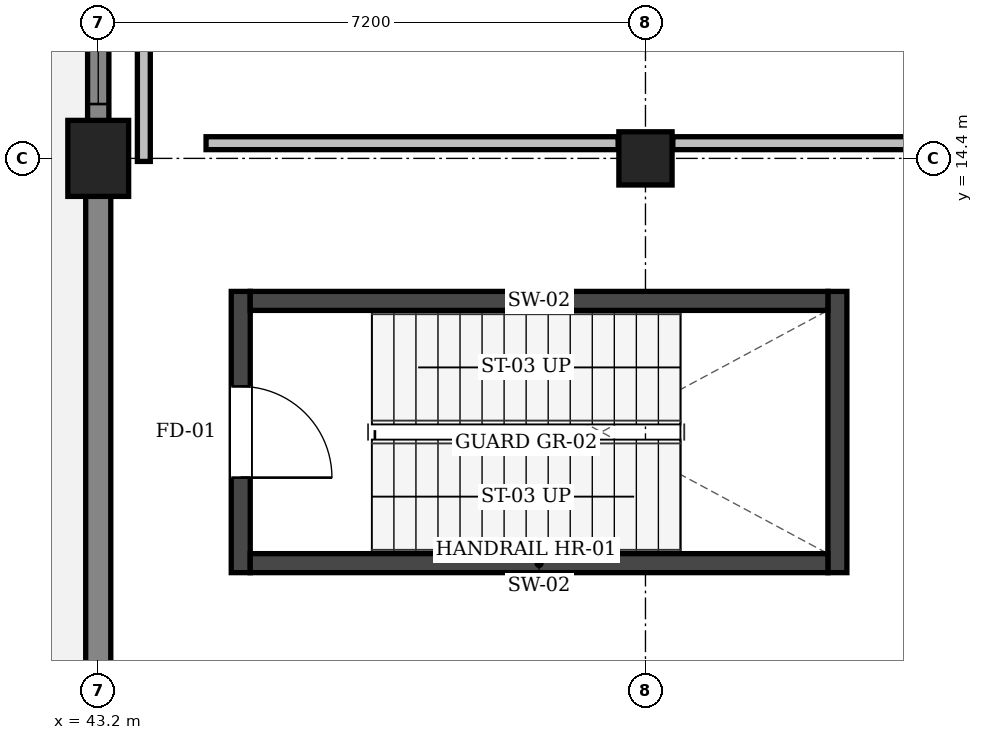
"""IFC4 building model, lengths in metres.
Left out: names, types, materials, properties, quantities, classifications, styles, units other than length and angle.
Written with IfcOpenShell. Run it as: python <this file> out.ifc"""

import sys

from ifc_helpers import new_model, si_unit, direction, frame, frame_2d, origin, origin_2d, place, context, subcontext, project, spatial, rectangle, extrude, element, fill, save


model = new_model("IFC4")
c1 = context("Model", 3, precision=1e-05, world=origin(), true_north=direction((0.0, 1.0)))
c2 = subcontext(c1, "Body", "Model", "MODEL_VIEW")
j1 = project(units=[si_unit("LENGTHUNIT", "METRE"), si_unit("PLANEANGLEUNIT", "RADIAN")], contexts=[c1])
p1 = place(None, origin())
s1 = spatial("IfcSite", under=j1, at=p1, CompositionType="ELEMENT")
p2 = place(p1, origin())
s2 = spatial("IfcBuilding", under=s1, at=p2, CompositionType="ELEMENT")
p3 = place(p2, frame((0.0, 0.0, 18.9)))
s3 = spatial("IfcBuildingStorey", under=s2, at=p3, CompositionType="ELEMENT", Elevation=18.9)
p4 = place(p3, frame((43.2, 14.4, 0.0), z_axis=(0.0, 0.0, 1.0), x_axis=(1.0, 0.0, 0.0)))
e1 = element("IfcColumn", 1, at=p4, inside=s3, PredefinedType="COLUMN", context=c2, shape_type="SweptSolid", body=[
    extrude(rectangle(XDim=0.8, YDim=1.0, at=origin_2d()), origin(), (0.0, 0.0, 1.0), 4.5),
])
p5 = place(p3, frame((50.4, 14.4, 0.0), z_axis=(0.0, 0.0, 1.0), x_axis=(1.0, 0.0, 0.0)))
e2 = element("IfcColumn", 2, at=p5, inside=s3, PredefinedType="COLUMN", context=c2, shape_type="SweptSolid", body=[
    extrude(rectangle(XDim=0.7, YDim=0.7, at=origin_2d()), origin(), (0.0, 0.0, 1.0), 4.5),
])
p6 = place(p3, frame((43.2, 7.2, 0.0), z_axis=(0.0, 0.0, 1.0), x_axis=(0.0, 1.0, 0.0)))
e3 = element("IfcWall", 3, at=p6, inside=s3, PredefinedType="SOLIDWALL", context=c2, shape_type="SweptSolid", body=[
    extrude(rectangle(XDim=7.2, YDim=0.33, at=frame_2d((3.6, 0.0))), origin(), (0.0, 0.0, 1.0), 4.22),
])
p7 = place(p3, frame((43.2, 14.4, 0.0), z_axis=(0.0, 0.0, 1.0), x_axis=(0.0, 1.0, 0.0)))
e4 = element("IfcWall", 4, at=p7, inside=s3, PredefinedType="SOLIDWALL", context=c2, shape_type="SweptSolid", body=[
    extrude(rectangle(XDim=7.2, YDim=0.28, at=frame_2d((3.6, 0.0))), origin(), (0.0, 0.0, 1.0), 4.22),
])
p8 = place(p7, frame((0.715, 0.0, 0.95)))
e5 = element("IfcOpeningElement", 5, at=p8, cuts=e4, PredefinedType="OPENING", context=c2, shape_type="SweptSolid", body=[
    extrude(rectangle(XDim=2.45, YDim=1.55, at=frame_2d((1.225, 0.775))), frame((0.0, 0.152, 0.0), z_axis=(0.0, -1.0, 0.0), x_axis=(1.0, 0.0, 0.0)), (0.0, 0.0, 1.0), 0.304),
])
p9 = place(p3, frame((45.075, 8.95, 0.0), z_axis=(0.0, 0.0, 1.0), x_axis=(0.0, 1.0, 0.0)))
e6 = element("IfcWall", 6, at=p9, inside=s3, PredefinedType="SHEAR", context=c2, shape_type="SweptSolid", body=[
    extrude(rectangle(XDim=3.7, YDim=0.25, at=frame_2d((1.85, 0.0))), origin(), (0.0, 0.0, 1.0), 4.25),
])
p10 = place(p9, frame((1.25, 0.0, 0.0)))
e7 = element("IfcOpeningElement", 7, at=p10, cuts=e6, PredefinedType="OPENING", context=c2, shape_type="SweptSolid", body=[
    extrude(rectangle(XDim=1.2, YDim=2.15, at=frame_2d((0.6, 1.075))), frame((0.0, 0.137, 0.0), z_axis=(0.0, -1.0, 0.0), x_axis=(1.0, 0.0, 0.0)), (0.0, 0.0, 1.0), 0.274),
])
p11 = place(p3, frame((52.925, 8.95, 0.0), z_axis=(0.0, 0.0, 1.0), x_axis=(0.0, 1.0, 0.0)))
e8 = element("IfcWall", 8, at=p11, inside=s3, PredefinedType="SHEAR", context=c2, shape_type="SweptSolid", body=[
    extrude(rectangle(XDim=3.7, YDim=0.25, at=frame_2d((1.85, 0.0))), origin(), (0.0, 0.0, 1.0), 4.25),
])
for number, where, z_axis, x_axis in (
    (9, (45.2, 9.075, 0.0), (0.0, 0.0, 1.0), (1.0, 0.0, 0.0)),
    (10, (45.2, 12.525, 0.0), (0.0, 0.0, 1.0), (1.0, 0.0, 0.0)),
):
    element("IfcWall", number, at=place(p3, frame(where, z_axis=z_axis, x_axis=x_axis)), inside=s3, PredefinedType="SHEAR", context=c2, shape_type="SweptSolid", body=[
        extrude(rectangle(XDim=7.6, YDim=0.25, at=frame_2d((3.8, 0.0))), origin(), (0.0, 0.0, 1.0), 4.25),
    ])
p12 = place(p3, frame((50.76, 14.6, 0.0), z_axis=(0.0, 0.0, 1.0), x_axis=(1.0, 0.0, 0.0)))
e11 = element("IfcWall", 11, at=p12, inside=s3, PredefinedType="PARTITIONING", context=c2, shape_type="SweptSolid", body=[
    extrude(rectangle(XDim=6.48, YDim=0.17, at=frame_2d((3.24, 0.0))), origin(), (0.0, 0.0, 1.0), 3.73),
])
p13 = place(p3, frame((44.618, 14.6, 0.0), z_axis=(0.0, 0.0, 1.0), x_axis=(1.0, 0.0, 0.0)))
e12 = element("IfcWall", 12, at=p13, inside=s3, PredefinedType="PARTITIONING", context=c2, shape_type="SweptSolid", body=[
    extrude(rectangle(XDim=5.422, YDim=0.17, at=frame_2d((2.711, 0.0))), origin(), (0.0, 0.0, 1.0), 3.73),
])
p14 = place(p3, frame((43.8, 14.36, 0.0), z_axis=(0.0, 0.0, 1.0), x_axis=(0.0, 1.0, 0.0)))
e13 = element("IfcWall", 13, at=p14, inside=s3, PredefinedType="PARTITIONING", context=c2, shape_type="SweptSolid", body=[
    extrude(rectangle(XDim=3.74, YDim=0.17, at=frame_2d((1.87, 0.0))), origin(), (0.0, 0.0, 1.0), 4.16),
])
p15 = place(p8, origin())
e14 = element("IfcWindow", 14, at=p15, inside=s3, PartitioningType="SINGLE_PANEL", PredefinedType="WINDOW", context=c2, shape_type="SweptSolid", body=[
    extrude(rectangle(XDim=2.45, YDim=1.55, at=frame_2d((1.225, 0.775))), frame((0.0, 0.03, 0.0), z_axis=(0.0, -1.0, 0.0), x_axis=(1.0, 0.0, 0.0)), (0.0, 0.0, 1.0), 0.06),
])
fill(e5, e14)
p16 = place(p10, frame((1.2, 0.0, 0.0), z_axis=(0.0, 0.0, 1.0), x_axis=(-1.0, 0.0, 0.0)))
e15 = element("IfcDoor", 15, at=p16, inside=s3, OperationType="SINGLE_SWING_RIGHT", PredefinedType="DOOR", context=c2, shape_type="SweptSolid", body=[
    extrude(rectangle(XDim=1.2, YDim=2.15, at=frame_2d((0.6, 1.075))), frame((0.0, 0.025, 0.0), z_axis=(0.0, -1.0, 0.0), x_axis=(1.0, 0.0, 0.0)), (0.0, 0.0, 1.0), 0.05),
])
fill(e7, e15)
save(model, sys.argv[1])
